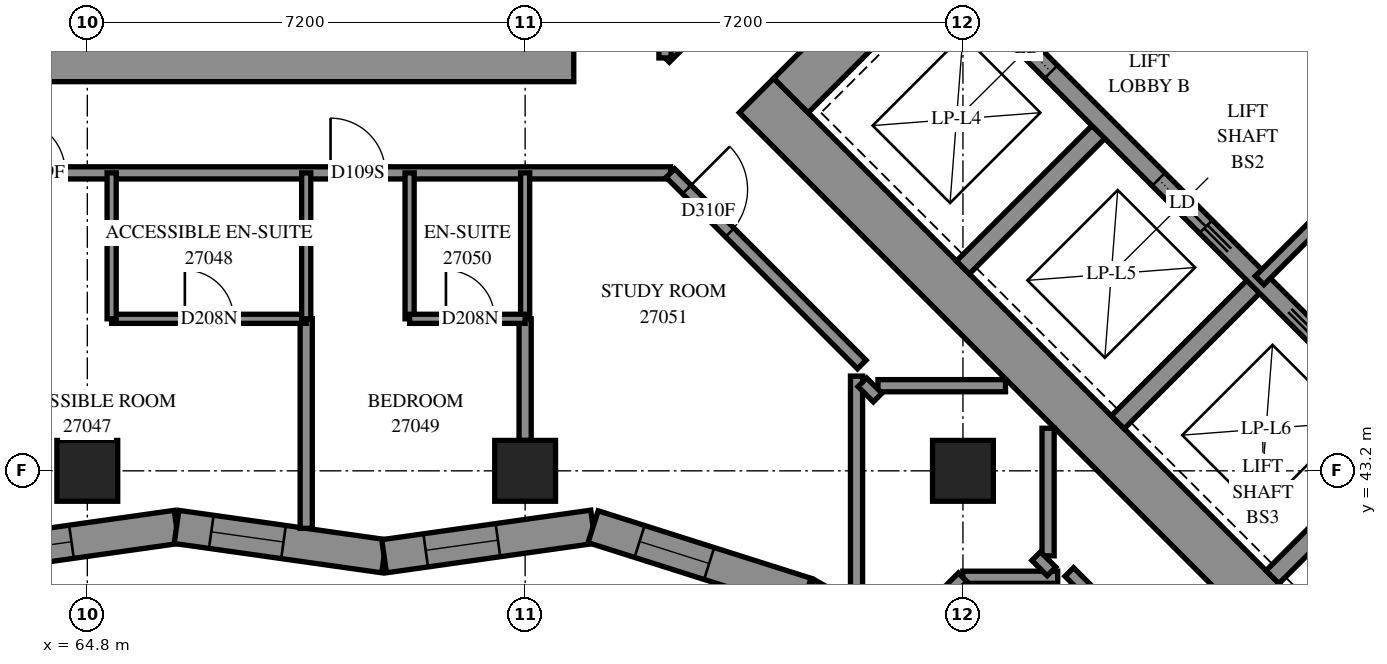
"""IFC4 building model, lengths in metres.
Left out: names, types, materials, properties, quantities, classifications, styles, units other than length and angle.
Written with IfcOpenShell. Run it as: python <this file> out.ifc"""

import sys

from ifc_helpers import new_model, si_unit, direction, frame, frame_2d, origin, origin_2d, place, context, subcontext, project, spatial, polyline, rectangle, outline, extrude, element, fill, save


model = new_model("IFC4")
c1 = context("Model", 3, precision=1e-05, world=origin(), true_north=direction((0.0, 1.0)))
c2 = subcontext(c1, "Body", "Model", "MODEL_VIEW")
j1 = project(units=[si_unit("LENGTHUNIT", "METRE"), si_unit("PLANEANGLEUNIT", "RADIAN")], contexts=[c1])
p1 = place(None, origin())
s1 = spatial("IfcSite", under=j1, at=p1, CompositionType="ELEMENT")
p2 = place(p1, origin())
s2 = spatial("IfcBuilding", under=s1, at=p2, CompositionType="ELEMENT")
p3 = place(p2, frame((0.0, 0.0, 101.6)))
s3 = spatial("IfcBuildingStorey", under=s2, at=p3, CompositionType="ELEMENT", Elevation=101.6)
for number, where, z_axis, x_axis in (
    (1, (64.8, 43.2, 0.0), (0.0, 0.0, 1.0), (1.0, 0.0, 0.0)),
    (2, (72.0, 43.2, 0.0), (0.0, 0.0, 1.0), (1.0, 0.0, 0.0)),
    (3, (79.2, 43.2, 0.0), (0.0, 0.0, 1.0), (1.0, 0.0, 0.0)),
):
    element("IfcColumn", number, at=place(p3, frame(where, z_axis=z_axis, x_axis=x_axis)), inside=s3, PredefinedType="COLUMN", context=c2, shape_type="SweptSolid", body=[
        extrude(rectangle(XDim=1.0, YDim=1.0, at=origin_2d()), origin(), (0.0, 0.0, 1.0), 3.1),
    ])
for number, where, z_axis, x_axis in (
    (4, (56.8, 50.0, -0.3), (0.0, 0.0, 1.0), (1.0, 0.0, 0.0)),
    (5, (75.806, 49.373, -0.3), (0.0, 0.0, 1.0), (0.707, -0.707, 0.0)),
):
    element("IfcWall", number, at=place(p3, frame(where, z_axis=z_axis, x_axis=x_axis)), inside=s3, PredefinedType="SHEAR", context=c2, shape_type="SweptSolid", body=[
        extrude(rectangle(XDim=16.0, YDim=0.8, at=frame_2d((8.0, 0.0))), origin(), (0.0, 0.0, 1.0), 2.7),
    ])
p4 = place(p3, frame((76.372, 49.373, -0.3), z_axis=(0.0, 0.0, 1.0), x_axis=(0.7071067812, 0.7071067812, 0.0)))
e6 = element("IfcWall", 6, at=p4, inside=s3, PredefinedType="SHEAR", context=c2, shape_type="SweptSolid", body=[
    extrude(rectangle(XDim=14.4, YDim=0.8, at=frame_2d((7.2, 0.0))), origin(), (0.0, 0.0, 1.0), 2.7),
])
p5 = place(p4, frame((4.55, 0.0, 0.3)))
e7 = element("IfcOpeningElement", 7, at=p5, cuts=e6, PredefinedType="OPENING", context=c2, shape_type="SweptSolid", body=[
    extrude(rectangle(XDim=1.1, YDim=2.1, at=frame_2d((0.55, 1.05))), frame((0.0, 0.41, 0.0), z_axis=(0.0, -1.0, 0.0), x_axis=(1.0, 0.0, 0.0)), (0.0, 0.0, 1.0), 0.82),
])
p6 = place(p4, frame((11.35, 0.0, 0.3)))
e8 = element("IfcOpeningElement", 8, at=p6, cuts=e6, PredefinedType="OPENING", context=c2, shape_type="SweptSolid", body=[
    extrude(rectangle(XDim=1.1, YDim=2.1, at=frame_2d((0.55, 1.05))), frame((0.0, 0.41, 0.0), z_axis=(0.0, -1.0, 0.0), x_axis=(1.0, 0.0, 0.0)), (0.0, 0.0, 1.0), 0.82),
])
p7 = place(p3, frame((79.2, 46.544, 0.0), z_axis=(0.0, 0.0, 1.0), x_axis=(0.7071219326, 0.7070916295, 0.0)))
e9 = element("IfcWall", 9, at=p7, inside=s3, PredefinedType="SOLIDWALL", context=c2, shape_type="SweptSolid", body=[
    extrude(rectangle(XDim=3.3, YDim=0.3, at=frame_2d((1.65, 0.0))), origin(), (0.0, 0.0, 1.0), 3.1),
])
for number, where, z_axis, x_axis in (
    (10, (81.746, 43.999, 0.0), (0.0, 0.0, 1.0), (0.707, 0.707, 0.0)),
    (11, (84.291, 41.453, 0.0), (0.0, 0.0, 1.0), (0.707, 0.707, 0.0)),
):
    element("IfcWall", number, at=place(p3, frame(where, z_axis=z_axis, x_axis=x_axis)), inside=s3, PredefinedType="SOLIDWALL", context=c2, shape_type="SweptSolid", body=[
        extrude(rectangle(XDim=3.3, YDim=0.3, at=frame_2d((1.65, 0.0))), origin(), (0.0, 0.0, 1.0), 3.1),
    ])
p8 = place(p3, frame((78.988, 51.423, 0.0), z_axis=(0.0, 0.0, 1.0), x_axis=(0.7071067812, -0.7071067812, 0.0)))
e12 = element("IfcWall", 12, at=p8, inside=s3, PredefinedType="SOLIDWALL", context=c2, shape_type="SweptSolid", body=[
    extrude(rectangle(XDim=14.4, YDim=0.3, at=frame_2d((7.2, 0.0))), origin(), (0.0, 0.0, 1.0), 3.1),
])
p9 = place(p8, frame((1.25, 0.0, 0.0)))
e13 = element("IfcOpeningElement", 13, at=p9, cuts=e12, PredefinedType="OPENING", context=c2, shape_type="SweptSolid", body=[
    extrude(rectangle(XDim=1.1, YDim=2.1, at=frame_2d((0.55, 1.05))), frame((0.0, 0.16, 0.0), z_axis=(0.0, -1.0, 0.0), x_axis=(1.0, 0.0, 0.0)), (0.0, 0.0, 1.0), 0.32),
])
p10 = place(p8, frame((4.85, 0.0, 0.0)))
e14 = element("IfcOpeningElement", 14, at=p10, cuts=e12, PredefinedType="OPENING", context=c2, shape_type="SweptSolid", body=[
    extrude(rectangle(XDim=1.1, YDim=2.1, at=frame_2d((0.55, 1.05))), frame((0.0, 0.16, 0.0), z_axis=(0.0, -1.0, 0.0), x_axis=(1.0, 0.0, 0.0)), (0.0, 0.0, 1.0), 0.32),
])
p11 = place(p8, frame((8.45, 0.0, 0.0)))
e15 = element("IfcOpeningElement", 15, at=p11, cuts=e12, PredefinedType="OPENING", context=c2, shape_type="SweptSolid", body=[
    extrude(rectangle(XDim=1.1, YDim=2.1, at=frame_2d((0.55, 1.05))), frame((0.0, 0.16, 0.0), z_axis=(0.0, -1.0, 0.0), x_axis=(1.0, 0.0, 0.0)), (0.0, 0.0, 1.0), 0.32),
])
p12 = place(p8, frame((12.05, 0.0, 0.0)))
e16 = element("IfcOpeningElement", 16, at=p12, cuts=e12, PredefinedType="OPENING", context=c2, shape_type="SweptSolid", body=[
    extrude(rectangle(XDim=1.1, YDim=2.1, at=frame_2d((0.55, 1.05))), frame((0.0, 0.16, 0.0), z_axis=(0.0, -1.0, 0.0), x_axis=(1.0, 0.0, 0.0)), (0.0, 0.0, 1.0), 0.32),
])
p13 = place(p3, frame((81.534, 53.969, 0.0), z_axis=(0.0, 0.0, 1.0), x_axis=(0.707103309, -0.7071102534, 0.0)))
e17 = element("IfcWall", 17, at=p13, inside=s3, PredefinedType="SOLIDWALL", context=c2, shape_type="SweptSolid", body=[
    extrude(rectangle(XDim=14.4, YDim=0.3, at=frame_2d((7.2, 0.0))), origin(), (0.0, 0.0, 1.0), 3.1),
])
p14 = place(p13, frame((12.05, 0.0, 0.0)))
e18 = element("IfcOpeningElement", 18, at=p14, cuts=e17, PredefinedType="OPENING", context=c2, shape_type="SweptSolid", body=[
    extrude(rectangle(XDim=1.1, YDim=2.1, at=frame_2d((0.55, 1.05))), frame((0.0, 0.16, 0.0), z_axis=(0.0, -1.0, 0.0), x_axis=(1.0, 0.0, 0.0)), (0.0, 0.0, 1.0), 0.32),
])
p15 = place(p3, frame((62.854, 41.796, 0.0), z_axis=(0.0, 0.0, 1.0), x_axis=(0.9901767876, 0.1398210616, 0.0)))
e19 = element("IfcWall", 19, at=p15, inside=s3, PredefinedType="SOLIDWALL", context=c2, shape_type="SweptSolid", body=[
    extrude(outline(polyline([(-0.039, -0.275), (3.409, -0.275), (3.486, 0.275), (0.039, 0.275), (-0.039, -0.275)])), origin(), (0.0, 0.0, 1.0), 3.1),
])
p16 = place(p15, frame((0.502, 0.0, 0.5)))
e20 = element("IfcOpeningElement", 20, at=p16, cuts=e19, PredefinedType="OPENING", context=c2, shape_type="SweptSolid", body=[
    extrude(rectangle(XDim=1.2, YDim=2.45, at=frame_2d((0.6, 1.225))), frame((0.0, 0.285, 0.0), z_axis=(0.0, -1.0, 0.0), x_axis=(1.0, 0.0, 0.0)), (0.0, 0.0, 1.0), 0.57),
])
p17 = place(p3, frame((66.267, 42.278, 0.0), z_axis=(0.0, 0.0, 1.0), x_axis=(0.9901773547, -0.1398170455, 0.0)))
e21 = element("IfcWall", 21, at=p17, inside=s3, PredefinedType="SOLIDWALL", context=c2, shape_type="SweptSolid", body=[
    extrude(outline(polyline([(0.039, -0.275), (3.486, -0.275), (3.409, 0.275), (-0.039, 0.275), (0.039, -0.275)])), origin(), (0.0, 0.0, 1.0), 3.1),
])
p18 = place(p17, frame((0.577, 0.0, 0.5)))
e22 = element("IfcOpeningElement", 22, at=p18, cuts=e21, PredefinedType="OPENING", context=c2, shape_type="SweptSolid", body=[
    extrude(rectangle(XDim=1.2, YDim=2.45, at=frame_2d((0.6, 1.225))), frame((0.0, 0.285, 0.0), z_axis=(0.0, -1.0, 0.0), x_axis=(1.0, 0.0, 0.0)), (0.0, 0.0, 1.0), 0.57),
])
p19 = place(p3, frame((69.681, 41.796, 0.0), z_axis=(0.0, 0.0, 1.0), x_axis=(0.9901775212, 0.1398158663, 0.0)))
e23 = element("IfcWall", 23, at=p19, inside=s3, PredefinedType="SOLIDWALL", context=c2, shape_type="SweptSolid", body=[
    extrude(outline(polyline([(-0.039, -0.275), (3.409, -0.275), (3.534, 0.275), (0.039, 0.275), (-0.039, -0.275)])), origin(), (0.0, 0.0, 1.0), 3.1),
])
p20 = place(p19, frame((0.691, 0.0, 0.5)))
e24 = element("IfcOpeningElement", 24, at=p20, cuts=e23, PredefinedType="OPENING", context=c2, shape_type="SweptSolid", body=[
    extrude(rectangle(XDim=1.2, YDim=2.45, at=frame_2d((0.6, 1.225))), frame((0.0, 0.285, 0.0), z_axis=(0.0, -1.0, 0.0), x_axis=(1.0, 0.0, 0.0)), (0.0, 0.0, 1.0), 0.57),
])
p21 = place(p3, frame((73.118, 42.281, 0.0), z_axis=(0.0, 0.0, 1.0), x_axis=(0.9532627783, -0.3021424756, 0.0)))
e25 = element("IfcWall", 25, at=p21, inside=s3, PredefinedType="SOLIDWALL", context=c2, shape_type="SweptSolid", body=[
    extrude(outline(polyline([(0.062, -0.275), (3.643, -0.275), (3.701, 0.275), (-0.062, 0.275), (0.062, -0.275)])), origin(), (0.0, 0.0, 1.0), 3.1),
])
p22 = place(p21, frame((0.802, 0.0, 0.5)))
e26 = element("IfcOpeningElement", 26, at=p22, cuts=e25, PredefinedType="OPENING", context=c2, shape_type="SweptSolid", body=[
    extrude(rectangle(XDim=1.2, YDim=2.45, at=frame_2d((0.6, 1.225))), frame((0.0, 0.285, 0.0), z_axis=(0.0, -1.0, 0.0), x_axis=(1.0, 0.0, 0.0)), (0.0, 0.0, 1.0), 0.57),
])
p23 = place(p3, frame((76.618, 41.171, 0.0), z_axis=(0.0, 0.0, 1.0), x_axis=(0.8690948676, -0.4946454398, 0.0)))
e27 = element("IfcWall", 27, at=p23, inside=s3, PredefinedType="SOLIDWALL", context=c2, shape_type="SweptSolid", body=[
    extrude(outline(polyline([(0.029, -0.275), (4.116, -0.275), (4.224, 0.275), (-0.029, 0.275), (0.029, -0.275)])), origin(), (0.0, 0.0, 1.0), 3.1),
])
p24 = place(p23, frame((0.343, 0.0, 0.5)))
e28 = element("IfcOpeningElement", 28, at=p24, cuts=e27, PredefinedType="OPENING", context=c2, shape_type="SweptSolid", body=[
    extrude(rectangle(XDim=1.2, YDim=2.45, at=frame_2d((0.6, 1.225))), frame((0.0, 0.285, 0.0), z_axis=(0.0, -1.0, 0.0), x_axis=(1.0, 0.0, 0.0)), (0.0, 0.0, 1.0), 0.57),
])
p25 = place(p23, frame((2.228, 0.0, 0.5)))
e29 = element("IfcOpeningElement", 29, at=p25, cuts=e27, PredefinedType="OPENING", context=c2, shape_type="SweptSolid", body=[
    extrude(rectangle(XDim=1.2, YDim=2.45, at=frame_2d((0.6, 1.225))), frame((0.0, 0.285, 0.0), z_axis=(0.0, -1.0, 0.0), x_axis=(1.0, 0.0, 0.0)), (0.0, 0.0, 1.0), 0.57),
])
p26 = place(p3, frame((84.079, 46.332, 0.0), z_axis=(0.0, 0.0, 1.0), x_axis=(0.7071067812, 0.7071067812, 0.0)))
e30 = element("IfcWall", 30, at=p26, inside=s3, PredefinedType="PARTITIONING", context=c2, shape_type="SweptSolid", body=[
    extrude(rectangle(XDim=3.6, YDim=0.2, at=frame_2d((1.8, 0.0))), origin(), (0.0, 0.0, 1.0), 3.1),
])
p27 = place(p3, frame((55.3, 48.1, 0.0), z_axis=(0.0, 0.0, 1.0), x_axis=(1.0, 0.0, 0.0)))
e31 = element("IfcWall", 31, at=p27, inside=s3, PredefinedType="PARTITIONING", context=c2, shape_type="SweptSolid", body=[
    extrude(rectangle(XDim=19.092, YDim=0.2, at=frame_2d((9.546, 0.0))), origin(), (0.0, 0.0, 1.0), 3.1),
])
p28 = place(p27, frame((4.6, 0.0, 0.0)))
e32 = element("IfcOpeningElement", 32, at=p28, cuts=e31, PredefinedType="OPENING", context=c2, shape_type="SweptSolid", body=[
    extrude(rectangle(XDim=0.9, YDim=2.1, at=frame_2d((0.45, 1.05))), frame((0.0, 0.11, 0.0), z_axis=(0.0, -1.0, 0.0), x_axis=(1.0, 0.0, 0.0)), (0.0, 0.0, 1.0), 0.22),
])
p29 = place(p27, frame((8.239, 0.0, 0.0)))
e33 = element("IfcOpeningElement", 33, at=p29, cuts=e31, PredefinedType="OPENING", context=c2, shape_type="SweptSolid", body=[
    extrude(rectangle(XDim=0.9, YDim=2.1, at=frame_2d((0.45, 1.05))), frame((0.0, 0.11, 0.0), z_axis=(0.0, -1.0, 0.0), x_axis=(1.0, 0.0, 0.0)), (0.0, 0.0, 1.0), 0.22),
])
p30 = place(p27, frame((13.5, 0.0, 0.0)))
e34 = element("IfcOpeningElement", 34, at=p30, cuts=e31, PredefinedType="OPENING", context=c2, shape_type="SweptSolid", body=[
    extrude(rectangle(XDim=0.9, YDim=2.1, at=frame_2d((0.45, 1.05))), frame((0.0, 0.11, 0.0), z_axis=(0.0, -1.0, 0.0), x_axis=(1.0, 0.0, 0.0)), (0.0, 0.0, 1.0), 0.22),
])
p31 = place(p3, frame((80.948, 41.536, 0.0), z_axis=(0.0, 0.0, 1.0), x_axis=(0.7071067812, -0.7071067812, 0.0)))
e35 = element("IfcWall", 35, at=p31, inside=s3, PredefinedType="PARTITIONING", context=c2, shape_type="SweptSolid", body=[
    extrude(rectangle(XDim=6.822, YDim=0.2, at=frame_2d((3.411, 0.0))), origin(), (0.0, 0.0, 1.0), 3.1),
])
p32 = place(p3, frame((74.301, 49.991, 0.0), z_axis=(0.0, 0.0, 1.0), x_axis=(0.7071067812, 0.7071067812, 0.0)))
e36 = element("IfcWall", 36, at=p32, inside=s3, PredefinedType="PARTITIONING", context=c2, shape_type="SweptSolid", body=[
    extrude(rectangle(XDim=5.951, YDim=0.2, at=frame_2d((2.975, 0.0))), origin(), (0.0, 0.0, 1.0), 3.1),
])
p33 = place(p3, frame((74.388, 48.096, 0.0), z_axis=(0.0, 0.0, 1.0), x_axis=(0.7071067812, -0.7071067812, 0.0)))
e37 = element("IfcWall", 37, at=p33, inside=s3, PredefinedType="PARTITIONING", context=c2, shape_type="SweptSolid", body=[
    extrude(rectangle(XDim=4.452, YDim=0.2, at=frame_2d((2.226, 0.0))), origin(), (0.0, 0.0, 1.0), 3.1),
])
p34 = place(p33, frame((0.382, 0.0, 0.0)))
e38 = element("IfcOpeningElement", 38, at=p34, cuts=e37, PredefinedType="OPENING", context=c2, shape_type="SweptSolid", body=[
    extrude(rectangle(XDim=1.0, YDim=2.1, at=frame_2d((0.5, 1.05))), frame((0.0, 0.11, 0.0), z_axis=(0.0, -1.0, 0.0), x_axis=(1.0, 0.0, 0.0)), (0.0, 0.0, 1.0), 0.22),
])
p35 = place(p3, frame((74.3, 49.99, 0.0), z_axis=(0.0, 0.0, 1.0), x_axis=(0.0, 1.0, 0.0)))
e39 = element("IfcWall", 39, at=p35, inside=s3, PredefinedType="PARTITIONING", context=c2, shape_type="SweptSolid", body=[
    extrude(rectangle(XDim=4.21, YDim=0.2, at=frame_2d((2.105, 0.0))), origin(), (0.0, 0.0, 1.0), 3.1),
])
p36 = place(p3, frame((77.45, 41.014, 0.0), z_axis=(0.0, 0.0, 1.0), x_axis=(0.0, 1.0, 0.0)))
e40 = element("IfcWall", 40, at=p36, inside=s3, PredefinedType="PARTITIONING", context=c2, shape_type="SweptSolid", body=[
    extrude(rectangle(XDim=3.744, YDim=0.2, at=frame_2d((1.872, 0.0))), origin(), (0.0, 0.0, 1.0), 3.1),
])
p37 = place(p3, frame((68.4, 42.254, 0.0), z_axis=(0.0, 0.0, 1.0), x_axis=(0.0, 1.0, 0.0)))
e41 = element("IfcWall", 41, at=p37, inside=s3, PredefinedType="PARTITIONING", context=c2, shape_type="SweptSolid", body=[
    extrude(rectangle(XDim=3.446, YDim=0.2, at=frame_2d((1.723, 0.0))), origin(), (0.0, 0.0, 1.0), 3.1),
])
p38 = place(p3, frame((65.2, 45.7, 0.0), z_axis=(0.0, 0.0, 1.0), x_axis=(1.0, 0.0, 0.0)))
e42 = element("IfcWall", 42, at=p38, inside=s3, PredefinedType="PARTITIONING", context=c2, shape_type="SweptSolid", body=[
    extrude(rectangle(XDim=3.2, YDim=0.15, at=frame_2d((1.6, 0.0))), origin(), (0.0, 0.0, 1.0), 3.1),
])
p39 = place(p38, frame((1.204, 0.0, 0.0)))
e43 = element("IfcOpeningElement", 43, at=p39, cuts=e42, PredefinedType="OPENING", context=c2, shape_type="SweptSolid", body=[
    extrude(rectangle(XDim=0.8, YDim=2.1, at=frame_2d((0.4, 1.05))), frame((0.0, 0.085, 0.0), z_axis=(0.0, -1.0, 0.0), x_axis=(1.0, 0.0, 0.0)), (0.0, 0.0, 1.0), 0.17),
])
for number, where, z_axis, x_axis in (
    (44, (65.2, 45.7, 0.0), (0.0, 0.0, 1.0), (0.0, 1.0, 0.0)),
    (45, (68.4, 45.7, 0.0), (0.0, 0.0, 1.0), (0.0, 1.0, 0.0)),
    (46, (70.1, 45.7, 0.0), (0.0, 0.0, 1.0), (0.0, 1.0, 0.0)),
    (47, (72.0, 45.7, 0.0), (0.0, 0.0, 1.0), (0.0, 1.0, 0.0)),
):
    element("IfcWall", number, at=place(p3, frame(where, z_axis=z_axis, x_axis=x_axis)), inside=s3, PredefinedType="PARTITIONING", context=c2, shape_type="SweptSolid", body=[
        extrude(rectangle(XDim=2.4, YDim=0.15, at=frame_2d((1.2, 0.0))), origin(), (0.0, 0.0, 1.0), 3.1),
    ])
for number, where, z_axis, x_axis in (
    (48, (77.802, 44.6, 0.0), (0.0, 0.0, 1.0), (1.0, 0.0, 0.0)),
    (49, (80.6, 41.802, 0.0), (0.0, 0.0, 1.0), (0.0, 1.0, 0.0)),
):
    element("IfcWall", number, at=place(p3, frame(where, z_axis=z_axis, x_axis=x_axis)), inside=s3, PredefinedType="PARTITIONING", context=c2, shape_type="SweptSolid", body=[
        extrude(rectangle(XDim=2.098, YDim=0.2, at=frame_2d((1.049, 0.0))), origin(), (0.0, 0.0, 1.0), 3.1),
    ])
p40 = place(p3, frame((72.0, 43.7, 0.0), z_axis=(0.0, 0.0, 1.0), x_axis=(0.0, 1.0, 0.0)))
e50 = element("IfcWall", 50, at=p40, inside=s3, PredefinedType="PARTITIONING", context=c2, shape_type="SweptSolid", body=[
    extrude(rectangle(XDim=2.0, YDim=0.2, at=frame_2d((1.0, 0.0))), origin(), (0.0, 0.0, 1.0), 3.1),
])
p41 = place(p3, frame((70.1, 45.7, 0.0), z_axis=(0.0, 0.0, 1.0), x_axis=(1.0, 0.0, 0.0)))
e51 = element("IfcWall", 51, at=p41, inside=s3, PredefinedType="PARTITIONING", context=c2, shape_type="SweptSolid", body=[
    extrude(rectangle(XDim=1.9, YDim=0.15, at=frame_2d((0.95, 0.0))), origin(), (0.0, 0.0, 1.0), 3.1),
])
p42 = place(p41, frame((0.598, 0.0, 0.0)))
e52 = element("IfcOpeningElement", 52, at=p42, cuts=e51, PredefinedType="OPENING", context=c2, shape_type="SweptSolid", body=[
    extrude(rectangle(XDim=0.8, YDim=2.1, at=frame_2d((0.4, 1.05))), frame((0.0, 0.085, 0.0), z_axis=(0.0, -1.0, 0.0), x_axis=(1.0, 0.0, 0.0)), (0.0, 0.0, 1.0), 0.17),
])
p43 = place(p3, frame((79.198, 41.45, 0.0), z_axis=(0.0, 0.0, 1.0), x_axis=(1.0, 0.0, 0.0)))
e53 = element("IfcWall", 53, at=p43, inside=s3, PredefinedType="PARTITIONING", context=c2, shape_type="SweptSolid", body=[
    extrude(rectangle(XDim=1.56, YDim=0.2, at=frame_2d((0.78, 0.0))), origin(), (0.0, 0.0, 1.0), 3.1),
])
p44 = place(p3, frame((78.285, 40.539, 0.0), z_axis=(0.0, 0.0, 1.0), x_axis=(0.7071067812, 0.7071067812, 0.0)))
e54 = element("IfcWall", 54, at=p44, inside=s3, PredefinedType="PARTITIONING", context=c2, shape_type="SweptSolid", body=[
    extrude(rectangle(XDim=1.288, YDim=0.2, at=frame_2d((0.644, 0.0))), origin(), (0.0, 0.0, 1.0), 3.1),
])
for number, where, z_axis, x_axis in (
    (55, (77.546, 44.656, 0.0), (0.0, 0.0, 1.0), (0.707, -0.707, 0.0)),
    (56, (80.405, 41.797, 0.0), (0.0, 0.0, 1.0), (0.707, -0.707, 0.0)),
):
    element("IfcWall", number, at=place(p3, frame(where, z_axis=z_axis, x_axis=x_axis)), inside=s3, PredefinedType="PARTITIONING", context=c2, shape_type="SweptSolid", body=[
        extrude(rectangle(XDim=0.355, YDim=0.2, at=frame_2d((0.177, 0.0))), origin(), (0.0, 0.0, 1.0), 3.1),
    ])
p45 = place(p16, origin())
e57 = element("IfcWindow", 57, at=p45, inside=s3, PartitioningType="SINGLE_PANEL", PredefinedType="WINDOW", context=c2, shape_type="SweptSolid", body=[
    extrude(rectangle(XDim=1.2, YDim=2.45, at=frame_2d((0.6, 1.225))), frame((0.0, 0.155, 0.0), z_axis=(0.0, -1.0, 0.0), x_axis=(1.0, 0.0, 0.0)), (0.0, 0.0, 1.0), 0.06),
])
fill(e20, e57)
p46 = place(p18, origin())
e58 = element("IfcWindow", 58, at=p46, inside=s3, PartitioningType="SINGLE_PANEL", PredefinedType="WINDOW", context=c2, shape_type="SweptSolid", body=[
    extrude(rectangle(XDim=1.2, YDim=2.45, at=frame_2d((0.6, 1.225))), frame((0.0, 0.155, 0.0), z_axis=(0.0, -1.0, 0.0), x_axis=(1.0, 0.0, 0.0)), (0.0, 0.0, 1.0), 0.06),
])
fill(e22, e58)
p47 = place(p20, origin())
e59 = element("IfcWindow", 59, at=p47, inside=s3, PartitioningType="SINGLE_PANEL", PredefinedType="WINDOW", context=c2, shape_type="SweptSolid", body=[
    extrude(rectangle(XDim=1.2, YDim=2.45, at=frame_2d((0.6, 1.225))), frame((0.0, 0.155, 0.0), z_axis=(0.0, -1.0, 0.0), x_axis=(1.0, 0.0, 0.0)), (0.0, 0.0, 1.0), 0.06),
])
fill(e24, e59)
p48 = place(p22, origin())
e60 = element("IfcWindow", 60, at=p48, inside=s3, PartitioningType="SINGLE_PANEL", PredefinedType="WINDOW", context=c2, shape_type="SweptSolid", body=[
    extrude(rectangle(XDim=1.2, YDim=2.45, at=frame_2d((0.6, 1.225))), frame((0.0, 0.155, 0.0), z_axis=(0.0, -1.0, 0.0), x_axis=(1.0, 0.0, 0.0)), (0.0, 0.0, 1.0), 0.06),
])
fill(e26, e60)
p49 = place(p9, origin())
e61 = element("IfcDoor", 61, at=p49, inside=s3, OperationType="SLIDING_TO_LEFT", PredefinedType="DOOR", context=c2, shape_type="SweptSolid", body=[
    extrude(rectangle(XDim=1.1, YDim=2.1, at=frame_2d((0.55, 1.05))), frame((0.0, 0.025, 0.0), z_axis=(0.0, -1.0, 0.0), x_axis=(1.0, 0.0, 0.0)), (0.0, 0.0, 1.0), 0.05),
])
fill(e13, e61)
p50 = place(p10, origin())
e62 = element("IfcDoor", 62, at=p50, inside=s3, OperationType="SLIDING_TO_RIGHT", PredefinedType="DOOR", context=c2, shape_type="SweptSolid", body=[
    extrude(rectangle(XDim=1.1, YDim=2.1, at=frame_2d((0.55, 1.05))), frame((0.0, 0.025, 0.0), z_axis=(0.0, -1.0, 0.0), x_axis=(1.0, 0.0, 0.0)), (0.0, 0.0, 1.0), 0.05),
])
fill(e14, e62)
p51 = place(p29, origin())
e63 = element("IfcDoor", 63, at=p51, inside=s3, OperationType="SINGLE_SWING_RIGHT", PredefinedType="DOOR", context=c2, shape_type="SweptSolid", body=[
    extrude(rectangle(XDim=0.9, YDim=2.1, at=frame_2d((0.45, 1.05))), frame((0.0, 0.025, 0.0), z_axis=(0.0, -1.0, 0.0), x_axis=(1.0, 0.0, 0.0)), (0.0, 0.0, 1.0), 0.05),
])
fill(e33, e63)
p52 = place(p39, origin())
e64 = element("IfcDoor", 64, at=p52, inside=s3, OperationType="SINGLE_SWING_RIGHT", PredefinedType="DOOR", context=c2, shape_type="SweptSolid", body=[
    extrude(rectangle(XDim=0.8, YDim=2.1, at=frame_2d((0.4, 1.05))), frame((0.0, 0.025, 0.0), z_axis=(0.0, -1.0, 0.0), x_axis=(1.0, 0.0, 0.0)), (0.0, 0.0, 1.0), 0.05),
])
fill(e43, e64)
p53 = place(p30, origin())
e65 = element("IfcDoor", 65, at=p53, inside=s3, OperationType="SINGLE_SWING_RIGHT", PredefinedType="DOOR", context=c2, shape_type="SweptSolid", body=[
    extrude(rectangle(XDim=0.9, YDim=2.1, at=frame_2d((0.45, 1.05))), frame((0.0, 0.025, 0.0), z_axis=(0.0, -1.0, 0.0), x_axis=(1.0, 0.0, 0.0)), (0.0, 0.0, 1.0), 0.05),
])
fill(e34, e65)
p54 = place(p42, origin())
e66 = element("IfcDoor", 66, at=p54, inside=s3, OperationType="SINGLE_SWING_RIGHT", PredefinedType="DOOR", context=c2, shape_type="SweptSolid", body=[
    extrude(rectangle(XDim=0.8, YDim=2.1, at=frame_2d((0.4, 1.05))), frame((0.0, 0.025, 0.0), z_axis=(0.0, -1.0, 0.0), x_axis=(1.0, 0.0, 0.0)), (0.0, 0.0, 1.0), 0.05),
])
fill(e52, e66)
p55 = place(p34, origin())
e67 = element("IfcDoor", 67, at=p55, inside=s3, OperationType="SINGLE_SWING_LEFT", PredefinedType="DOOR", context=c2, shape_type="SweptSolid", body=[
    extrude(rectangle(XDim=1.0, YDim=2.1, at=frame_2d((0.5, 1.05))), frame((0.0, 0.025, 0.0), z_axis=(0.0, -1.0, 0.0), x_axis=(1.0, 0.0, 0.0)), (0.0, 0.0, 1.0), 0.05),
])
fill(e38, e67)
save(model, sys.argv[1])
